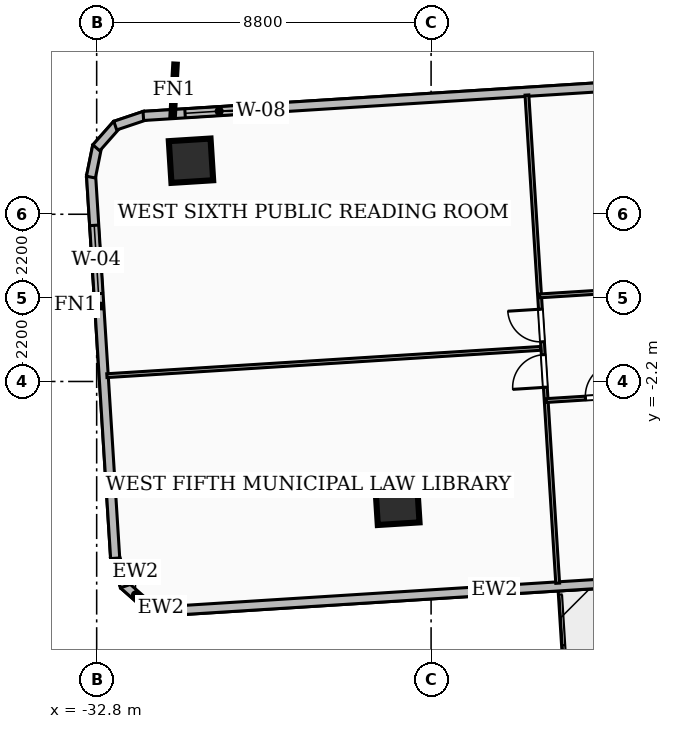
"""IFC4 building model, lengths in metres.
Left out: names, types, materials, properties, quantities, classifications, styles, units other than length and angle.
Written with IfcOpenShell. Run it as: python <this file> out.ifc"""

import sys

from ifc_helpers import new_model, si_unit, direction, frame, frame_2d, origin, origin_2d, place, context, subcontext, project, spatial, rectangle, extrude, element, fill, save


model = new_model("IFC4")
c1 = context("Model", 3, precision=1e-05, world=origin(), true_north=direction((0.0, 1.0)))
c2 = subcontext(c1, "Body", "Model", "MODEL_VIEW")
j1 = project(units=[si_unit("LENGTHUNIT", "METRE"), si_unit("PLANEANGLEUNIT", "RADIAN")], contexts=[c1])
p1 = place(None, origin())
s1 = spatial("IfcSite", under=j1, at=p1, CompositionType="ELEMENT")
p2 = place(p1, origin())
s2 = spatial("IfcBuilding", under=s1, at=p2, CompositionType="ELEMENT")
p3 = place(p2, frame((0.0, 0.0, 49.68)))
s3 = spatial("IfcBuildingStorey", under=s2, at=p3, CompositionType="ELEMENT", Elevation=49.68)
for number, where, z_axis, x_axis in (
    (1, (-30.318, 3.609, 0.0), (0.0, 0.0, 1.0), (0.998, 0.063, 0.0)),
    (2, (-24.888, -5.393, 0.0), (0.0, 0.0, 1.0), (0.998, 0.063, 0.0)),
):
    element("IfcColumn", number, at=place(p3, frame(where, z_axis=z_axis, x_axis=x_axis)), inside=s3, PredefinedType="COLUMN", context=c2, shape_type="SweptSolid", body=[
        extrude(rectangle(XDim=1.1, YDim=1.1, at=origin_2d()), origin(), (0.0, 0.0, 1.0), 3.6),
    ])
p4 = place(p3, frame((-13.911, -7.167, 0.0), z_axis=(0.0, 0.0, 1.0), x_axis=(-0.99802143782, -0.062874554885, 0.0)))
e3 = element("IfcWall", 3, at=p4, inside=s3, PredefinedType="SOLIDWALL", context=c2, shape_type="SweptSolid", body=[
    extrude(rectangle(XDim=16.875, YDim=0.24, at=frame_2d((8.438, 0.0))), origin(), (0.0, 0.0, 1.0), 2.624),
])
p5 = place(p4, frame((4.4, 0.0, 0.0)))
e4 = element("IfcOpeningElement", 4, at=p5, cuts=e3, PredefinedType="OPENING", context=c2, shape_type="SweptSolid", body=[
    extrude(rectangle(XDim=1.1, YDim=2.1, at=frame_2d((0.55, 1.05))), frame((0.0, 0.13, 0.0), z_axis=(0.0, -1.0, 0.0), x_axis=(1.0, 0.0, 0.0)), (0.0, 0.0, 1.0), 0.26),
])
p6 = place(p3, frame((-30.703, -8.231, 0.0), z_axis=(0.0, 0.0, 1.0), x_axis=(-0.980115061473, 0.198430003461, 0.0)))
e5 = element("IfcWall", 5, at=p6, inside=s3, PredefinedType="SOLIDWALL", context=c2, shape_type="SweptSolid", body=[
    extrude(rectangle(XDim=0.832, YDim=0.24, at=frame_2d((0.416, 0.0))), origin(), (0.0, 0.0, 1.0), 3.32),
])
p7 = place(p3, frame((-31.474, -8.088, 0.0), z_axis=(0.0, 0.0, 1.0), x_axis=(-0.749934065497, 0.661512582954, 0.0)))
e6 = element("IfcWall", 6, at=p7, inside=s3, PredefinedType="SOLIDWALL", context=c2, shape_type="SweptSolid", body=[
    extrude(rectangle(XDim=0.814, YDim=0.24, at=frame_2d((0.407, 0.0))), origin(), (0.0, 0.0, 1.0), 3.32),
])
p8 = place(p3, frame((-32.058, -7.59, 0.0), z_axis=(0.0, 0.0, 1.0), x_axis=(-0.318960399163, 0.947768043229, 0.0)))
e7 = element("IfcWall", 7, at=p8, inside=s3, PredefinedType="SOLIDWALL", context=c2, shape_type="SweptSolid", body=[
    extrude(rectangle(XDim=0.831, YDim=0.24, at=frame_2d((0.415, 0.0))), origin(), (0.0, 0.0, 1.0), 3.32),
])
p9 = place(p3, frame((-32.313, -6.852, 0.0), z_axis=(0.0, 0.0, 1.0), x_axis=(-0.062877947964, 0.998021224053, 0.0)))
e8 = element("IfcWall", 8, at=p9, inside=s3, PredefinedType="SOLIDWALL", context=c2, shape_type="SweptSolid", body=[
    extrude(rectangle(XDim=10.099, YDim=0.24, at=frame_2d((5.05, 0.0))), origin(), (0.0, 0.0, 1.0), 3.32),
])
p10 = place(p9, frame((6.977, 0.0, 0.85)))
e9 = element("IfcOpeningElement", 9, at=p10, cuts=e8, PredefinedType="OPENING", context=c2, shape_type="SweptSolid", body=[
    extrude(rectangle(XDim=1.8, YDim=2.0, at=frame_2d((0.9, 1.0))), frame((0.0, 0.13, 0.0), z_axis=(0.0, -1.0, 0.0), x_axis=(1.0, 0.0, 0.0)), (0.0, 0.0, 1.0), 0.26),
])
p11 = place(p3, frame((-32.951, 3.177, 0.0), z_axis=(0.0, 0.0, 1.0), x_axis=(0.197076231398, 0.980388167522, 0.0)))
e10 = element("IfcWall", 10, at=p11, inside=s3, PredefinedType="SOLIDWALL", context=c2, shape_type="SweptSolid", body=[
    extrude(rectangle(XDim=0.831, YDim=0.24, at=frame_2d((0.416, 0.0))), origin(), (0.0, 0.0, 1.0), 3.32),
])
p12 = place(p3, frame((-32.809, 3.948, 0.0), z_axis=(0.0, 0.0, 1.0), x_axis=(0.661532449753, 0.749916540639, 0.0)))
e11 = element("IfcWall", 11, at=p12, inside=s3, PredefinedType="SOLIDWALL", context=c2, shape_type="SweptSolid", body=[
    extrude(rectangle(XDim=0.815, YDim=0.24, at=frame_2d((0.407, 0.0))), origin(), (0.0, 0.0, 1.0), 3.32),
])
p13 = place(p3, frame((-32.311, 4.532, 0.0), z_axis=(0.0, 0.0, 1.0), x_axis=(0.94779876374, 0.318869100812, 0.0)))
e12 = element("IfcWall", 12, at=p13, inside=s3, PredefinedType="SOLIDWALL", context=c2, shape_type="SweptSolid", body=[
    extrude(rectangle(XDim=0.832, YDim=0.24, at=frame_2d((0.416, 0.0))), origin(), (0.0, 0.0, 1.0), 3.32),
])
p14 = place(p3, frame((-31.572, 4.787, 0.0), z_axis=(0.0, 0.0, 1.0), x_axis=(0.998025974342, 0.062802504235, 0.0)))
e13 = element("IfcWall", 13, at=p14, inside=s3, PredefinedType="SOLIDWALL", context=c2, shape_type="SweptSolid", body=[
    extrude(rectangle(XDim=16.875, YDim=0.24, at=frame_2d((8.438, 0.0))), origin(), (0.0, 0.0, 1.0), 3.32),
])
p15 = place(p14, frame((1.1, 0.0, 0.85)))
e14 = element("IfcOpeningElement", 14, at=p15, cuts=e13, PredefinedType="OPENING", context=c2, shape_type="SweptSolid", body=[
    extrude(rectangle(XDim=1.8, YDim=1.8, at=frame_2d((0.9, 0.9))), frame((0.0, 0.13, 0.0), z_axis=(0.0, -1.0, 0.0), x_axis=(1.0, 0.0, 0.0)), (0.0, 0.0, 1.0), 0.26),
])
p16 = place(p3, frame((-20.972, -2.702, 0.0), z_axis=(0.0, 0.0, 1.0), x_axis=(0.998032440214, 0.062699667311, 0.0)))
e15 = element("IfcWall", 15, at=p16, inside=s3, PredefinedType="PARTITIONING", context=c2, shape_type="SweptSolid", body=[
    extrude(rectangle(XDim=6.81, YDim=0.1, at=frame_2d((3.405, 0.0))), origin(), (0.0, 0.0, 1.0), 3.32),
])
p17 = place(p16, frame((4.44, 0.0, 0.0)))
e16 = element("IfcOpeningElement", 16, at=p17, cuts=e15, PredefinedType="OPENING", context=c2, shape_type="SweptSolid", body=[
    extrude(rectangle(XDim=0.86, YDim=2.04, at=frame_2d((0.43, 1.02))), frame((0.0, 0.06, 0.0), z_axis=(0.0, -1.0, 0.0), x_axis=(1.0, 0.0, 0.0)), (0.0, 0.0, 1.0), 0.12),
])
p18 = place(p16, frame((1.035, 0.0, 0.0)))
e17 = element("IfcOpeningElement", 17, at=p18, cuts=e15, PredefinedType="OPENING", context=c2, shape_type="SweptSolid", body=[
    extrude(rectangle(XDim=0.86, YDim=2.04, at=frame_2d((0.43, 1.02))), frame((0.0, 0.06, 0.0), z_axis=(0.0, -1.0, 0.0), x_axis=(1.0, 0.0, 0.0)), (0.0, 0.0, 1.0), 0.12),
])
p19 = place(p3, frame((-14.348, 0.48, 0.0), z_axis=(0.0, 0.0, 1.0), x_axis=(-0.998023598481, -0.062840248847, 0.0)))
e18 = element("IfcWall", 18, at=p19, inside=s3, PredefinedType="PARTITIONING", context=c2, shape_type="SweptSolid", body=[
    extrude(rectangle(XDim=6.811, YDim=0.1, at=frame_2d((3.405, 0.0))), origin(), (0.0, 0.0, 1.0), 3.32),
])
p20 = place(p19, frame((1.035, 0.0, 0.0)))
e19 = element("IfcOpeningElement", 19, at=p20, cuts=e18, PredefinedType="OPENING", context=c2, shape_type="SweptSolid", body=[
    extrude(rectangle(XDim=0.86, YDim=2.04, at=frame_2d((0.43, 1.02))), frame((0.0, 0.06, 0.0), z_axis=(0.0, -1.0, 0.0), x_axis=(1.0, 0.0, 0.0)), (0.0, 0.0, 1.0), 0.12),
])
p21 = place(p19, frame((4.44, 0.0, 0.0)))
e20 = element("IfcOpeningElement", 20, at=p21, cuts=e18, PredefinedType="OPENING", context=c2, shape_type="SweptSolid", body=[
    extrude(rectangle(XDim=0.86, YDim=2.04, at=frame_2d((0.43, 1.02))), frame((0.0, 0.06, 0.0), z_axis=(0.0, -1.0, 0.0), x_axis=(1.0, 0.0, 0.0)), (0.0, 0.0, 1.0), 0.12),
])
p22 = place(p3, frame((-21.118, -1.329, 0.0), z_axis=(0.0, 0.0, 1.0), x_axis=(-0.998026908856, -0.062787651642, 0.0)))
e21 = element("IfcWall", 21, at=p22, inside=s3, PredefinedType="PARTITIONING", context=c2, shape_type="SweptSolid", body=[
    extrude(rectangle(XDim=11.436, YDim=0.1, at=frame_2d((5.718, 0.0))), origin(), (0.0, 0.0, 1.0), 2.812),
])
p23 = place(p3, frame((-20.669, -7.508, 0.0), z_axis=(0.0, 0.0, 1.0), x_axis=(-0.062863651969, 0.998022124635, 0.0)))
e22 = element("IfcWall", 22, at=p23, inside=s3, PredefinedType="PARTITIONING", context=c2, shape_type="SweptSolid", body=[
    extrude(rectangle(XDim=12.87, YDim=0.1, at=frame_2d((6.435, 0.0))), origin(), (0.0, 0.0, 1.0), 2.401),
])
p24 = place(p23, frame((6.365, 0.0, 0.0)))
e23 = element("IfcOpeningElement", 23, at=p24, cuts=e22, PredefinedType="OPENING", context=c2, shape_type="SweptSolid", body=[
    extrude(rectangle(XDim=0.86, YDim=2.04, at=frame_2d((0.43, 1.02))), frame((0.0, 0.06, 0.0), z_axis=(0.0, -1.0, 0.0), x_axis=(1.0, 0.0, 0.0)), (0.0, 0.0, 1.0), 0.12),
])
p25 = place(p23, frame((5.165, 0.0, 0.0)))
e24 = element("IfcOpeningElement", 24, at=p25, cuts=e22, PredefinedType="OPENING", context=c2, shape_type="SweptSolid", body=[
    extrude(rectangle(XDim=0.86, YDim=2.04, at=frame_2d((0.43, 1.02))), frame((0.0, 0.06, 0.0), z_axis=(0.0, -1.0, 0.0), x_axis=(1.0, 0.0, 0.0)), (0.0, 0.0, 1.0), 0.12),
])
p26 = place(p10, origin())
e25 = element("IfcWindow", 25, at=p26, inside=s3, PartitioningType="SINGLE_PANEL", PredefinedType="WINDOW", context=c2, shape_type="SweptSolid", body=[
    extrude(rectangle(XDim=1.8, YDim=2.0, at=frame_2d((0.9, 1.0))), frame((0.0, 0.03, 0.0), z_axis=(0.0, -1.0, 0.0), x_axis=(1.0, 0.0, 0.0)), (0.0, 0.0, 1.0), 0.06),
])
fill(e9, e25)
p27 = place(p15, origin())
e26 = element("IfcWindow", 26, at=p27, inside=s3, PartitioningType="SINGLE_PANEL", PredefinedType="WINDOW", context=c2, shape_type="SweptSolid", body=[
    extrude(rectangle(XDim=1.8, YDim=1.8, at=frame_2d((0.9, 0.9))), frame((0.0, 0.03, 0.0), z_axis=(0.0, -1.0, 0.0), x_axis=(1.0, 0.0, 0.0)), (0.0, 0.0, 1.0), 0.06),
])
fill(e14, e26)
p28 = place(p18, origin())
e27 = element("IfcDoor", 27, at=p28, inside=s3, OperationType="SINGLE_SWING_RIGHT", PredefinedType="DOOR", context=c2, shape_type="SweptSolid", body=[
    extrude(rectangle(XDim=0.86, YDim=2.04, at=frame_2d((0.43, 1.02))), frame((0.0, 0.025, 0.0), z_axis=(0.0, -1.0, 0.0), x_axis=(1.0, 0.0, 0.0)), (0.0, 0.0, 1.0), 0.05),
])
fill(e17, e27)
p29 = place(p24, origin())
e28 = element("IfcDoor", 28, at=p29, inside=s3, OperationType="SINGLE_SWING_RIGHT", PredefinedType="DOOR", context=c2, shape_type="SweptSolid", body=[
    extrude(rectangle(XDim=0.86, YDim=2.04, at=frame_2d((0.43, 1.02))), frame((0.0, 0.025, 0.0), z_axis=(0.0, -1.0, 0.0), x_axis=(1.0, 0.0, 0.0)), (0.0, 0.0, 1.0), 0.05),
])
fill(e23, e28)
p30 = place(p25, origin())
e29 = element("IfcDoor", 29, at=p30, inside=s3, OperationType="SINGLE_SWING_LEFT", PredefinedType="DOOR", context=c2, shape_type="SweptSolid", body=[
    extrude(rectangle(XDim=0.86, YDim=2.04, at=frame_2d((0.43, 1.02))), frame((0.0, 0.025, 0.0), z_axis=(0.0, -1.0, 0.0), x_axis=(1.0, 0.0, 0.0)), (0.0, 0.0, 1.0), 0.05),
])
fill(e24, e29)
save(model, sys.argv[1])
